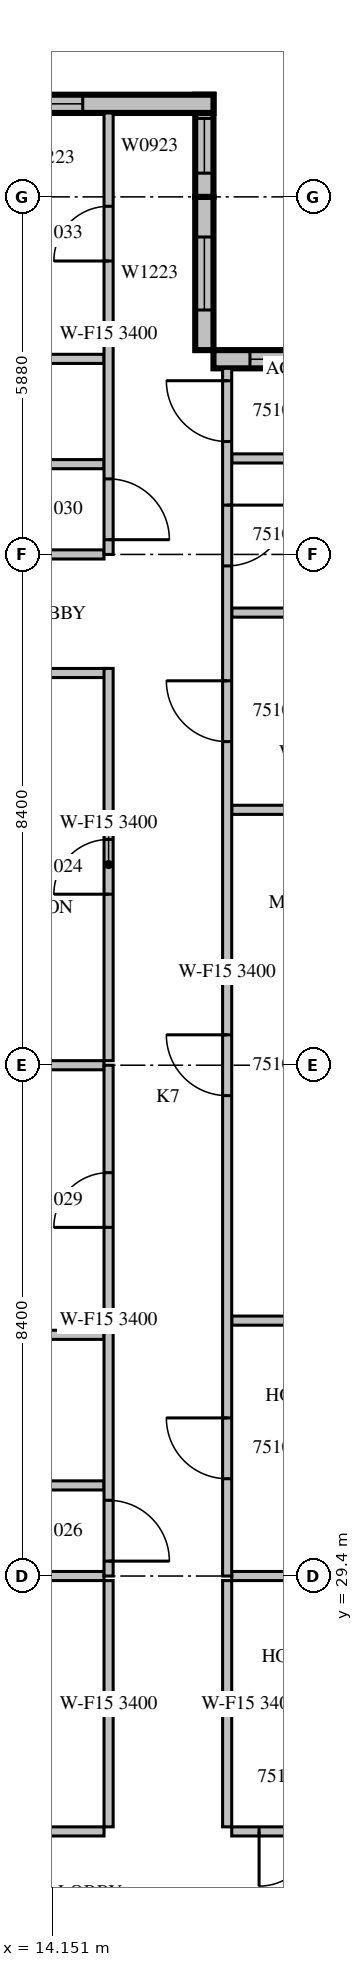
"""IFC4 building model, lengths in metres.
Left out: names, types, materials, properties, quantities, classifications, styles, units other than length and angle.
Written with IfcOpenShell. Run it as: python <this file> out.ifc"""

import sys

from ifc_helpers import new_model, si_unit, direction, frame, frame_2d, origin, place, context, subcontext, project, spatial, rectangle, extrude, source, transform, mapped, element, fill, save


model = new_model("IFC4")
c1 = context("Model", 3, precision=1e-05, world=origin(), true_north=direction((0.0, 1.0)))
c2 = subcontext(c1, "Body", "Model", "MODEL_VIEW")
j1 = project(units=[si_unit("LENGTHUNIT", "METRE"), si_unit("PLANEANGLEUNIT", "RADIAN")], contexts=[c1])
p1 = place(None, origin())
s1 = spatial("IfcSite", under=j1, at=p1, CompositionType="ELEMENT")
p2 = place(p1, origin())
s2 = spatial("IfcBuilding", under=s1, at=p2, CompositionType="ELEMENT")
p3 = place(p2, frame((0.0, 0.0, 227.2)))
s3 = spatial("IfcBuildingStorey", under=s2, at=p3, CompositionType="ELEMENT", Elevation=227.2)
m1 = source(origin(), c2, "Body", "SweptSolid", [
    extrude(rectangle(XDim=4.2, YDim=0.3, at=frame_2d((2.1, 0.0))), origin(), (0.0, 0.0, 1.0), 3.4),
])
p4 = place(p3, frame((21.0, 49.41, 0.0), z_axis=(0.0, 0.0, 1.0), x_axis=(-1.0, 0.0, 0.0)))
e1 = element("IfcWall", 1, at=p4, inside=s3, PredefinedType="STANDARD", context=c2, shape_type="MappedRepresentation", body=[
    mapped(m1, transform((0.0, 0.0, 0.0), scale=1.0)),
])
m2 = source(origin(), c2, "Body", "SweptSolid", [
    extrude(rectangle(XDim=3.0, YDim=2.3, at=frame_2d((1.5, 1.15))), frame((0.0, 0.16, 0.0), z_axis=(0.0, -1.0, 0.0), x_axis=(1.0, 0.0, 0.0)), (0.0, 0.0, 1.0), 0.32),
])
p5 = place(p4, frame((0.6, 0.0, 0.6)))
e2 = element("IfcOpeningElement", 2, at=p5, cuts=e1, PredefinedType="OPENING", context=c2, shape_type="MappedRepresentation", body=[
    mapped(m2, transform((0.0, 0.0, 0.0), scale=1.0)),
])
m3 = source(origin(), c2, "Body", "SweptSolid", [
    extrude(rectangle(XDim=2.52, YDim=0.3, at=frame_2d((1.26, 0.0))), origin(), (0.0, 0.0, 1.0), 3.4),
])
p6 = place(p3, frame((16.65, 49.56, 0.0), z_axis=(0.0, 0.0, 1.0), x_axis=(0.0, 1.0, 0.0)))
e3 = element("IfcWall", 3, at=p6, inside=s3, PredefinedType="STANDARD", context=c2, shape_type="MappedRepresentation", body=[
    mapped(m3, transform((0.0, 0.0, 0.0), scale=1.0)),
])
m4 = source(origin(), c2, "Body", "SweptSolid", [
    extrude(rectangle(XDim=1.2, YDim=2.3, at=frame_2d((0.6, 1.15))), frame((0.0, 0.16, 0.0), z_axis=(0.0, -1.0, 0.0), x_axis=(1.0, 0.0, 0.0)), (0.0, 0.0, 1.0), 0.32),
])
p7 = place(p6, frame((0.66, 0.0, 0.6)))
e4 = element("IfcOpeningElement", 4, at=p7, cuts=e3, PredefinedType="OPENING", context=c2, shape_type="MappedRepresentation", body=[
    mapped(m4, transform((0.0, 0.0, 0.0), scale=1.0)),
])
m5 = source(origin(), c2, "Body", "SweptSolid", [
    extrude(rectangle(XDim=1.68, YDim=0.3, at=frame_2d((0.84, 0.0))), origin(), (0.0, 0.0, 1.0), 3.4),
])
p8 = place(p3, frame((16.65, 52.08, 0.0), z_axis=(0.0, 0.0, 1.0), x_axis=(0.0, 1.0, 0.0)))
e5 = element("IfcWall", 5, at=p8, inside=s3, PredefinedType="STANDARD", context=c2, shape_type="MappedRepresentation", body=[
    mapped(m5, transform((0.0, 0.0, 0.0), scale=1.0)),
])
m6 = source(origin(), c2, "Body", "SweptSolid", [
    extrude(rectangle(XDim=0.9, YDim=2.3, at=frame_2d((0.45, 1.15))), frame((0.0, 0.16, 0.0), z_axis=(0.0, -1.0, 0.0), x_axis=(1.0, 0.0, 0.0)), (0.0, 0.0, 1.0), 0.32),
])
p9 = place(p8, frame((0.39, 0.0, 0.6)))
e6 = element("IfcOpeningElement", 6, at=p9, cuts=e5, PredefinedType="OPENING", context=c2, shape_type="MappedRepresentation", body=[
    mapped(m6, transform((0.0, 0.0, 0.0), scale=1.0)),
])
m7 = source(origin(), c2, "Body", "SweptSolid", [
    extrude(rectangle(XDim=10.5, YDim=0.3, at=frame_2d((5.25, 0.0))), origin(), (0.0, 0.0, 1.0), 3.4),
])
p10 = place(p3, frame((16.8, 53.61, 0.0), z_axis=(0.0, 0.0, 1.0), x_axis=(-1.0, 0.0, 0.0)))
e7 = element("IfcWall", 7, at=p10, inside=s3, PredefinedType="STANDARD", context=c2, shape_type="MappedRepresentation", body=[
    mapped(m7, transform((0.0, 0.0, 0.0), scale=1.0)),
])
p11 = place(p10, frame((2.15, 0.0, 0.6)))
e8 = element("IfcOpeningElement", 8, at=p11, cuts=e7, PredefinedType="OPENING", context=c2, shape_type="MappedRepresentation", body=[
    mapped(m4, transform((0.0, 0.0, 0.0), scale=1.0)),
])
m8 = source(origin(), c2, "Body", "SweptSolid", [
    extrude(rectangle(XDim=1.8, YDim=2.3, at=frame_2d((0.9, 1.15))), frame((0.0, 0.16, 0.0), z_axis=(0.0, -1.0, 0.0), x_axis=(1.0, 0.0, 0.0)), (0.0, 0.0, 1.0), 0.32),
])
p12 = place(p10, frame((8.025, 0.0, 0.6)))
e9 = element("IfcOpeningElement", 9, at=p12, cuts=e7, PredefinedType="OPENING", context=c2, shape_type="MappedRepresentation", body=[
    mapped(m8, transform((0.0, 0.0, 0.0), scale=1.0)),
])
m9 = source(origin(), c2, "Body", "SweptSolid", [
    extrude(rectangle(XDim=8.495, YDim=0.15, at=frame_2d((4.247, 0.0))), origin(), (0.0, 0.0, 1.0), 3.4),
])
p13 = place(p3, frame((6.505, 25.2, 0.0), z_axis=(0.0, 0.0, 1.0), x_axis=(1.0, 0.0, 0.0)))
e10 = element("IfcWall", 10, at=p13, inside=s3, PredefinedType="PARTITIONING", context=c2, shape_type="MappedRepresentation", body=[
    mapped(m9, transform((0.0, 0.0, 0.0), scale=1.0)),
])
m10 = source(origin(), c2, "Body", "SweptSolid", [
    extrude(rectangle(XDim=0.9, YDim=2.1, at=frame_2d((0.45, 1.05))), frame((0.0, 0.085, 0.0), z_axis=(0.0, -1.0, 0.0), x_axis=(1.0, 0.0, 0.0)), (0.0, 0.0, 1.0), 0.17),
])
p14 = place(p13, frame((0.695, 0.0, 0.0)))
e11 = element("IfcOpeningElement", 11, at=p14, cuts=e10, PredefinedType="OPENING", context=c2, shape_type="MappedRepresentation", body=[
    mapped(m10, transform((0.0, 0.0, 0.0), scale=1.0)),
])
p15 = place(p13, frame((5.77, 0.0, 0.0)))
e12 = element("IfcOpeningElement", 12, at=p15, cuts=e10, PredefinedType="OPENING", context=c2, shape_type="MappedRepresentation", body=[
    mapped(m10, transform((0.0, 0.0, 0.0), scale=1.0)),
])
m11 = source(origin(), c2, "Body", "SweptSolid", [
    extrude(rectangle(XDim=3.6, YDim=0.15, at=frame_2d((1.8, 0.0))), origin(), (0.0, 0.0, 1.0), 3.4),
])
p16 = place(p3, frame((17.1, 25.2, 0.0), z_axis=(0.0, 0.0, 1.0), x_axis=(1.0, 0.0, 0.0)))
e13 = element("IfcWall", 13, at=p16, inside=s3, PredefinedType="PARTITIONING", context=c2, shape_type="MappedRepresentation", body=[
    mapped(m11, transform((0.0, 0.0, 0.0), scale=1.0)),
])
p17 = place(p16, frame((0.45, 0.0, 0.0)))
e14 = element("IfcOpeningElement", 14, at=p17, cuts=e13, PredefinedType="OPENING", context=c2, shape_type="MappedRepresentation", body=[
    mapped(m10, transform((0.0, 0.0, 0.0), scale=1.0)),
])
m12 = source(origin(), c2, "Body", "SweptSolid", [
    extrude(rectangle(XDim=4.05, YDim=0.15, at=frame_2d((2.025, 0.0))), origin(), (0.0, 0.0, 1.0), 3.4),
])
for number, where, z_axis, x_axis in (
    (15, (15.075, 25.275, 0.0), (0.0, 0.0, 1.0), (0.0, 1.0, 0.0)),
    (16, (17.025, 29.325, 0.0), (0.0, 0.0, 1.0), (0.0, -1.0, 0.0)),
):
    element("IfcWall", number, at=place(p3, frame(where, z_axis=z_axis, x_axis=x_axis)), inside=s3, PredefinedType="PARTITIONING", context=c2, shape_type="MappedRepresentation", body=[
        mapped(m12, transform((0.0, 0.0, 0.0), scale=1.0)),
    ])
m13 = source(origin(), c2, "Body", "SweptSolid", [
    extrude(rectangle(XDim=4.101, YDim=0.15, at=frame_2d((2.05, 0.0))), origin(), (0.0, 0.0, 1.0), 3.4),
])
p18 = place(p3, frame((15.0, 29.4, 0.0), z_axis=(0.0, 0.0, 1.0), x_axis=(-1.0, 0.0, 0.0)))
e17 = element("IfcWall", 17, at=p18, inside=s3, PredefinedType="PARTITIONING", context=c2, shape_type="MappedRepresentation", body=[
    mapped(m13, transform((0.0, 0.0, 0.0), scale=1.0)),
])
m14 = source(origin(), c2, "Body", "SweptSolid", [
    extrude(rectangle(XDim=3.101, YDim=0.15, at=frame_2d((1.55, 0.0))), origin(), (0.0, 0.0, 1.0), 3.4),
])
p19 = place(p3, frame((20.201, 29.4, 0.0), z_axis=(0.0, 0.0, 1.0), x_axis=(-1.0, 0.0, 0.0)))
e18 = element("IfcWall", 18, at=p19, inside=s3, PredefinedType="PARTITIONING", context=c2, shape_type="MappedRepresentation", body=[
    mapped(m14, transform((0.0, 0.0, 0.0), scale=1.0)),
])
m15 = source(origin(), c2, "Body", "SweptSolid", [
    extrude(rectangle(XDim=2.775, YDim=0.15, at=frame_2d((1.387, 0.0))), origin(), (0.0, 0.0, 1.0), 3.4),
])
p20 = place(p3, frame((15.075, 44.25, 0.0), z_axis=(0.0, 0.0, 1.0), x_axis=(-1.0, 0.0, 0.0)))
e19 = element("IfcWall", 19, at=p20, inside=s3, PredefinedType="PARTITIONING", context=c2, shape_type="MappedRepresentation", body=[
    mapped(m15, transform((0.0, 0.0, 0.0), scale=1.0)),
])
m16 = source(origin(), c2, "Body", "SweptSolid", [
    extrude(rectangle(XDim=6.45, YDim=0.15, at=frame_2d((3.225, 0.0))), origin(), (0.0, 0.0, 1.0), 3.4),
])
p21 = place(p3, frame((15.075, 37.875, 0.0), z_axis=(0.0, 0.0, 1.0), x_axis=(0.0, 1.0, 0.0)))
e20 = element("IfcWall", 20, at=p21, inside=s3, PredefinedType="PARTITIONING", context=c2, shape_type="MappedRepresentation", body=[
    mapped(m16, transform((0.0, 0.0, 0.0), scale=1.0)),
])
p22 = place(p21, frame((2.737, 0.0, 0.0)))
e21 = element("IfcOpeningElement", 21, at=p22, cuts=e20, PredefinedType="OPENING", context=c2, shape_type="MappedRepresentation", body=[
    mapped(m10, transform((0.0, 0.0, 0.0), scale=1.0)),
])
m17 = source(origin(), c2, "Body", "SweptSolid", [
    extrude(rectangle(XDim=3.95, YDim=0.15, at=frame_2d((1.975, 0.0))), origin(), (0.0, 0.0, 1.0), 3.4),
])
for number, where, z_axis, x_axis in (
    (22, (15.0, 30.89, 0.0), (0.0, 0.0, 1.0), (-1.0, 0.0, 0.0)),
    (23, (15.0, 33.367, 0.0), (0.0, 0.0, 1.0), (-1.0, 0.0, 0.0)),
    (24, (15.0, 37.8, 0.0), (0.0, 0.0, 1.0), (-1.0, 0.0, 0.0)),
    (25, (15.0, 47.684, 0.0), (0.0, 0.0, 1.0), (-1.0, 0.0, 0.0)),
    (26, (15.0, 49.416, 0.0), (0.0, 0.0, 1.0), (-1.0, 0.0, 0.0)),
    (27, (15.0, 46.2, 0.0), (0.0, 0.0, 1.0), (-1.0, 0.0, 0.0)),
):
    element("IfcWall", number, at=place(p3, frame(where, z_axis=z_axis, x_axis=x_axis)), inside=s3, PredefinedType="PARTITIONING", context=c2, shape_type="MappedRepresentation", body=[
        mapped(m17, transform((0.0, 0.0, 0.0), scale=1.0)),
    ])
for number, where, z_axis, x_axis in (
    (28, (17.1, 45.244, 0.0), (0.0, 0.0, 1.0), (1.0, 0.0, 0.0)),
    (29, (17.1, 47.779, 0.0), (0.0, 0.0, 1.0), (1.0, 0.0, 0.0)),
    (30, (20.7, 33.6, 0.0), (0.0, 0.0, 1.0), (-1.0, 0.0, 0.0)),
    (31, (20.7, 42.0, 0.0), (0.0, 0.0, 1.0), (-1.0, 0.0, 0.0)),
):
    element("IfcWall", number, at=place(p3, frame(where, z_axis=z_axis, x_axis=x_axis)), inside=s3, PredefinedType="PARTITIONING", context=c2, shape_type="MappedRepresentation", body=[
        mapped(m11, transform((0.0, 0.0, 0.0), scale=1.0)),
    ])
m18 = source(origin(), c2, "Body", "SweptSolid", [
    extrude(rectangle(XDim=8.4, YDim=0.15, at=frame_2d((4.2, 0.0))), origin(), (0.0, 0.0, 1.0), 3.4),
])
p23 = place(p3, frame((15.075, 29.4, 0.0), z_axis=(0.0, 0.0, 1.0), x_axis=(0.0, 1.0, 0.0)))
e32 = element("IfcWall", 32, at=p23, inside=s3, PredefinedType="PARTITIONING", context=c2, shape_type="MappedRepresentation", body=[
    mapped(m18, transform((0.0, 0.0, 0.0), scale=1.0)),
])
m19 = source(origin(), c2, "Body", "SweptSolid", [
    extrude(rectangle(XDim=1.0, YDim=2.1, at=frame_2d((0.5, 1.05))), frame((0.0, 0.085, 0.0), z_axis=(0.0, -1.0, 0.0), x_axis=(1.0, 0.0, 0.0)), (0.0, 0.0, 1.0), 0.17),
])
p24 = place(p23, frame((0.245, 0.0, 0.0)))
e33 = element("IfcOpeningElement", 33, at=p24, cuts=e32, PredefinedType="OPENING", context=c2, shape_type="MappedRepresentation", body=[
    mapped(m19, transform((0.0, 0.0, 0.0), scale=1.0)),
])
p25 = place(p23, frame((5.733, 0.0, 0.0)))
e34 = element("IfcOpeningElement", 34, at=p25, cuts=e32, PredefinedType="OPENING", context=c2, shape_type="MappedRepresentation", body=[
    mapped(m10, transform((0.0, 0.0, 0.0), scale=1.0)),
])
m20 = source(origin(), c2, "Body", "SweptSolid", [
    extrude(rectangle(XDim=7.26, YDim=0.15, at=frame_2d((3.63, 0.0))), origin(), (0.0, 0.0, 1.0), 3.4),
])
p26 = place(p3, frame((15.075, 46.2, 0.0), z_axis=(0.0, 0.0, 1.0), x_axis=(0.0, 1.0, 0.0)))
e35 = element("IfcWall", 35, at=p26, inside=s3, PredefinedType="PARTITIONING", context=c2, shape_type="MappedRepresentation", body=[
    mapped(m20, transform((0.0, 0.0, 0.0), scale=1.0)),
])
p27 = place(p26, frame((0.242, 0.0, 0.0)))
e36 = element("IfcOpeningElement", 36, at=p27, cuts=e35, PredefinedType="OPENING", context=c2, shape_type="MappedRepresentation", body=[
    mapped(m19, transform((0.0, 0.0, 0.0), scale=1.0)),
])
p28 = place(p26, frame((4.825, 0.0, 0.0)))
e37 = element("IfcOpeningElement", 37, at=p28, cuts=e35, PredefinedType="OPENING", context=c2, shape_type="MappedRepresentation", body=[
    mapped(m10, transform((0.0, 0.0, 0.0), scale=1.0)),
])
m21 = source(origin(), c2, "Body", "SweptSolid", [
    extrude(rectangle(XDim=19.86, YDim=0.15, at=frame_2d((9.93, 0.0))), origin(), (0.0, 0.0, 1.0), 3.4),
])
p29 = place(p3, frame((17.025, 49.26, 0.0), z_axis=(0.0, 0.0, 1.0), x_axis=(0.0, -1.0, 0.0)))
e38 = element("IfcWall", 38, at=p29, inside=s3, PredefinedType="PARTITIONING", context=c2, shape_type="MappedRepresentation", body=[
    mapped(m21, transform((0.0, 0.0, 0.0), scale=1.0)),
])
p30 = place(p29, frame((17.26, 0.0, 0.0)))
e39 = element("IfcOpeningElement", 39, at=p30, cuts=e38, PredefinedType="OPENING", context=c2, shape_type="MappedRepresentation", body=[
    mapped(m19, transform((0.0, 0.0, 0.0), scale=1.0)),
])
p31 = place(p29, frame((10.96, 0.0, 0.0)))
e40 = element("IfcOpeningElement", 40, at=p31, cuts=e38, PredefinedType="OPENING", context=c2, shape_type="MappedRepresentation", body=[
    mapped(m19, transform((0.0, 0.0, 0.0), scale=1.0)),
])
p32 = place(p29, frame((5.138, 0.0, 0.0)))
e41 = element("IfcOpeningElement", 41, at=p32, cuts=e38, PredefinedType="OPENING", context=c2, shape_type="MappedRepresentation", body=[
    mapped(m19, transform((0.0, 0.0, 0.0), scale=1.0)),
])
p33 = place(p29, frame((2.249, 0.0, 0.0)))
e42 = element("IfcOpeningElement", 42, at=p33, cuts=e38, PredefinedType="OPENING", context=c2, shape_type="MappedRepresentation", body=[
    mapped(m19, transform((0.0, 0.0, 0.0), scale=1.0)),
])
p34 = place(p29, frame((0.203, 0.0, 0.0)))
e43 = element("IfcOpeningElement", 43, at=p34, cuts=e38, PredefinedType="OPENING", context=c2, shape_type="MappedRepresentation", body=[
    mapped(m19, transform((0.0, 0.0, 0.0), scale=1.0)),
])
m22 = source(origin(), c2, "Body", "SweptSolid", [
    extrude(rectangle(XDim=3.0, YDim=2.3, at=frame_2d((1.5, 1.15))), frame((0.0, 0.03, 0.0), z_axis=(0.0, -1.0, 0.0), x_axis=(1.0, 0.0, 0.0)), (0.0, 0.0, 1.0), 0.06),
])
p35 = place(p5, origin())
e44 = element("IfcWindow", 44, at=p35, inside=s3, PartitioningType="SINGLE_PANEL", PredefinedType="WINDOW", context=c2, shape_type="MappedRepresentation", body=[
    mapped(m22, transform((0.0, 0.0, 0.0), scale=1.0)),
])
fill(e2, e44)
m23 = source(origin(), c2, "Body", "SweptSolid", [
    extrude(rectangle(XDim=1.2, YDim=2.3, at=frame_2d((0.6, 1.15))), frame((0.0, 0.03, 0.0), z_axis=(0.0, -1.0, 0.0), x_axis=(1.0, 0.0, 0.0)), (0.0, 0.0, 1.0), 0.06),
])
p36 = place(p7, origin())
e45 = element("IfcWindow", 45, at=p36, inside=s3, PartitioningType="SINGLE_PANEL", PredefinedType="WINDOW", context=c2, shape_type="MappedRepresentation", body=[
    mapped(m23, transform((0.0, 0.0, 0.0), scale=1.0)),
])
fill(e4, e45)
m24 = source(origin(), c2, "Body", "SweptSolid", [
    extrude(rectangle(XDim=0.9, YDim=2.3, at=frame_2d((0.45, 1.15))), frame((0.0, 0.03, 0.0), z_axis=(0.0, -1.0, 0.0), x_axis=(1.0, 0.0, 0.0)), (0.0, 0.0, 1.0), 0.06),
])
p37 = place(p9, origin())
e46 = element("IfcWindow", 46, at=p37, inside=s3, PartitioningType="SINGLE_PANEL", PredefinedType="WINDOW", context=c2, shape_type="MappedRepresentation", body=[
    mapped(m24, transform((0.0, 0.0, 0.0), scale=1.0)),
])
fill(e6, e46)
p38 = place(p11, origin())
e47 = element("IfcWindow", 47, at=p38, inside=s3, PartitioningType="SINGLE_PANEL", PredefinedType="WINDOW", context=c2, shape_type="MappedRepresentation", body=[
    mapped(m23, transform((0.0, 0.0, 0.0), scale=1.0)),
])
fill(e8, e47)
m25 = source(origin(), c2, "Body", "SweptSolid", [
    extrude(rectangle(XDim=0.9, YDim=2.1, at=frame_2d((0.45, 1.05))), frame((0.0, 0.025, 0.0), z_axis=(0.0, -1.0, 0.0), x_axis=(1.0, 0.0, 0.0)), (0.0, 0.0, 1.0), 0.05),
])
p39 = place(p17, origin())
e48 = element("IfcDoor", 48, at=p39, inside=s3, OperationType="SINGLE_SWING_RIGHT", PredefinedType="DOOR", context=c2, shape_type="MappedRepresentation", body=[
    mapped(m25, transform((0.0, 0.0, 0.0), scale=1.0)),
])
fill(e14, e48)
p40 = place(p22, origin())
e49 = element("IfcDoor", 49, at=p40, inside=s3, OperationType="SINGLE_SWING_LEFT", PredefinedType="DOOR", context=c2, shape_type="MappedRepresentation", body=[
    mapped(m25, transform((0.0, 0.0, 0.0), scale=1.0)),
])
fill(e21, e49)
m26 = source(origin(), c2, "Body", "SweptSolid", [
    extrude(rectangle(XDim=1.0, YDim=2.1, at=frame_2d((0.5, 1.05))), frame((0.0, 0.025, 0.0), z_axis=(0.0, -1.0, 0.0), x_axis=(1.0, 0.0, 0.0)), (0.0, 0.0, 1.0), 0.05),
])
p41 = place(p24, origin())
e50 = element("IfcDoor", 50, at=p41, inside=s3, OperationType="SINGLE_SWING_RIGHT", PredefinedType="DOOR", context=c2, shape_type="MappedRepresentation", body=[
    mapped(m26, transform((0.0, 0.0, 0.0), scale=1.0)),
])
fill(e33, e50)
p42 = place(p25, origin())
e51 = element("IfcDoor", 51, at=p42, inside=s3, OperationType="SINGLE_SWING_LEFT", PredefinedType="DOOR", context=c2, shape_type="MappedRepresentation", body=[
    mapped(m25, transform((0.0, 0.0, 0.0), scale=1.0)),
])
fill(e34, e51)
p43 = place(p27, origin())
e52 = element("IfcDoor", 52, at=p43, inside=s3, OperationType="SINGLE_SWING_RIGHT", PredefinedType="DOOR", context=c2, shape_type="MappedRepresentation", body=[
    mapped(m26, transform((0.0, 0.0, 0.0), scale=1.0)),
])
fill(e36, e52)
p44 = place(p28, origin())
e53 = element("IfcDoor", 53, at=p44, inside=s3, OperationType="SINGLE_SWING_LEFT", PredefinedType="DOOR", context=c2, shape_type="MappedRepresentation", body=[
    mapped(m25, transform((0.0, 0.0, 0.0), scale=1.0)),
])
fill(e37, e53)
p45 = place(p30, origin())
e54 = element("IfcDoor", 54, at=p45, inside=s3, OperationType="SINGLE_SWING_RIGHT", PredefinedType="DOOR", context=c2, shape_type="MappedRepresentation", body=[
    mapped(m26, transform((0.0, 0.0, 0.0), scale=1.0)),
])
fill(e39, e54)
p46 = place(p31, origin())
e55 = element("IfcDoor", 55, at=p46, inside=s3, OperationType="SINGLE_SWING_RIGHT", PredefinedType="DOOR", context=c2, shape_type="MappedRepresentation", body=[
    mapped(m26, transform((0.0, 0.0, 0.0), scale=1.0)),
])
fill(e40, e55)
p47 = place(p32, origin())
e56 = element("IfcDoor", 56, at=p47, inside=s3, OperationType="SINGLE_SWING_RIGHT", PredefinedType="DOOR", context=c2, shape_type="MappedRepresentation", body=[
    mapped(m26, transform((0.0, 0.0, 0.0), scale=1.0)),
])
fill(e41, e56)
p48 = place(p33, origin())
e57 = element("IfcDoor", 57, at=p48, inside=s3, OperationType="SINGLE_SWING_LEFT", PredefinedType="DOOR", context=c2, shape_type="MappedRepresentation", body=[
    mapped(m26, transform((0.0, 0.0, 0.0), scale=1.0)),
])
fill(e42, e57)
p49 = place(p34, origin())
e58 = element("IfcDoor", 58, at=p49, inside=s3, OperationType="SINGLE_SWING_RIGHT", PredefinedType="DOOR", context=c2, shape_type="MappedRepresentation", body=[
    mapped(m26, transform((0.0, 0.0, 0.0), scale=1.0)),
])
fill(e43, e58)
save(model, sys.argv[1])
